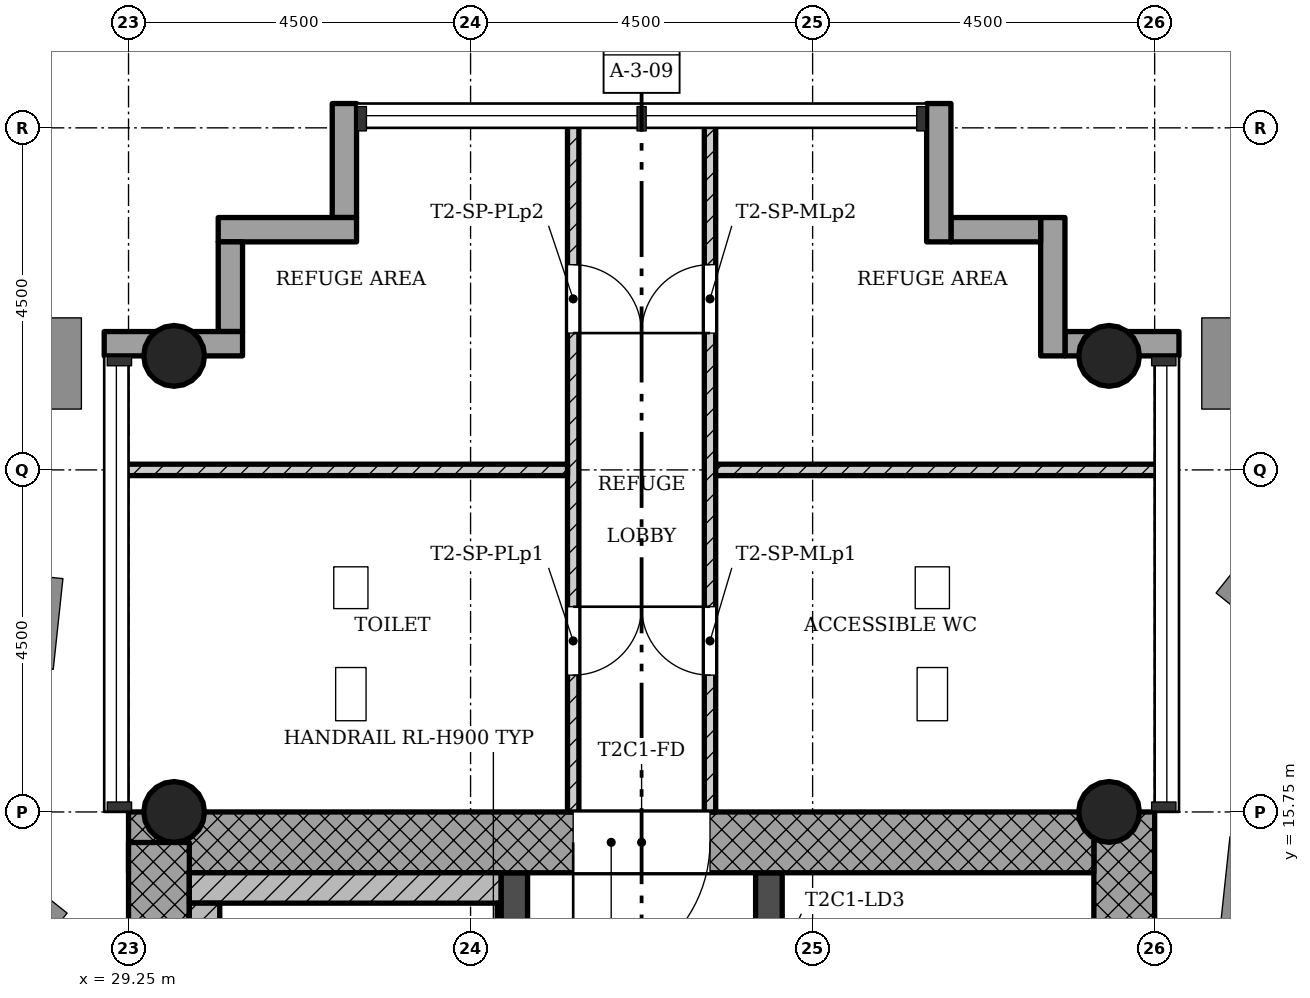
"""IFC4 building model, lengths in metres.
Left out: names, types, materials, properties, quantities, classifications, styles, units other than length and angle.
Written with IfcOpenShell. Run it as: python <this file> out.ifc"""

import sys

from ifc_helpers import new_model, si_unit, direction, frame, frame_2d, origin, origin_2d, place, context, subcontext, project, spatial, rectangle, hollow_circle, extrude, element, fill, save


model = new_model("IFC4")
c1 = context("Model", 3, precision=1e-05, world=origin(), true_north=direction((0.0, 1.0)))
c2 = subcontext(c1, "Body", "Model", "MODEL_VIEW")
j1 = project(units=[si_unit("LENGTHUNIT", "METRE"), si_unit("PLANEANGLEUNIT", "RADIAN")], contexts=[c1])
p1 = place(None, origin())
s1 = spatial("IfcSite", under=j1, at=p1, CompositionType="ELEMENT")
p2 = place(p1, origin())
s2 = spatial("IfcBuilding", under=s1, at=p2, CompositionType="ELEMENT")
p3 = place(p2, frame((0.0, 0.0, 181.3)))
s3 = spatial("IfcBuildingStorey", under=s2, at=p3, CompositionType="ELEMENT", Elevation=181.3)
p4 = place(p3, frame((42.35, 7.55, 0.0), z_axis=(0.0, 0.0, 1.0), x_axis=(0.0, 1.0, 0.0)))
e1 = element("IfcWall", 1, at=p4, inside=s3, PredefinedType="SHEAR", context=c2, shape_type="SweptSolid", body=[
    extrude(rectangle(XDim=8.2, YDim=0.8, at=frame_2d((4.1, 0.0))), origin(), (0.0, 0.0, 1.0), 4.5),
])
p5 = place(p3, frame((41.95, 15.35, 0.0), z_axis=(0.0, 0.0, 1.0), x_axis=(-1.0, 0.0, 0.0)))
e2 = element("IfcWall", 2, at=p5, inside=s3, PredefinedType="SHEAR", context=c2, shape_type="SweptSolid", body=[
    extrude(rectangle(XDim=12.7, YDim=0.8, at=frame_2d((6.35, 0.0))), origin(), (0.0, 0.0, 1.0), 4.5),
])
p6 = place(p5, frame((5.05, 0.0, 0.0)))
e3 = element("IfcOpeningElement", 3, at=p6, cuts=e2, PredefinedType="OPENING", context=c2, shape_type="SweptSolid", body=[
    extrude(rectangle(XDim=1.8, YDim=2.1, at=frame_2d((0.9, 1.05))), frame((0.0, 0.41, 0.0), z_axis=(0.0, -1.0, 0.0), x_axis=(1.0, 0.0, 0.0)), (0.0, 0.0, 1.0), 0.82),
])
p7 = place(p3, frame((29.65, 15.348, 0.0), z_axis=(0.0, 0.0, 1.0), x_axis=(0.0, -1.0, 0.0)))
e4 = element("IfcWall", 4, at=p7, inside=s3, PredefinedType="SHEAR", context=c2, shape_type="SweptSolid", body=[
    extrude(rectangle(XDim=8.796, YDim=0.8, at=frame_2d((4.398, 0.0))), origin(), (0.0, 0.0, 1.0), 4.5),
])
p8 = place(p3, frame((34.325, 7.55, 0.0), z_axis=(0.0, 0.0, 1.0), x_axis=(0.0, 1.0, 0.0)))
e5 = element("IfcWall", 5, at=p8, inside=s3, PredefinedType="SHEAR", context=c2, shape_type="SweptSolid", body=[
    extrude(rectangle(XDim=7.4, YDim=0.35, at=frame_2d((3.7, 0.0))), origin(), (0.0, 0.0, 1.0), 4.5),
])
p9 = place(p8, frame((0.85, 0.0, 0.0)))
e6 = element("IfcOpeningElement", 6, at=p9, cuts=e5, PredefinedType="OPENING", context=c2, shape_type="SweptSolid", body=[
    extrude(rectangle(XDim=0.9, YDim=2.1, at=frame_2d((0.45, 1.05))), frame((0.0, 0.185, 0.0), z_axis=(0.0, -1.0, 0.0), x_axis=(1.0, 0.0, 0.0)), (0.0, 0.0, 1.0), 0.37),
])
p10 = place(p3, frame((37.675, 7.55, 0.0), z_axis=(0.0, 0.0, 1.0), x_axis=(0.0, 1.0, 0.0)))
e7 = element("IfcWall", 7, at=p10, inside=s3, PredefinedType="SHEAR", context=c2, shape_type="SweptSolid", body=[
    extrude(rectangle(XDim=7.4, YDim=0.35, at=frame_2d((3.7, 0.0))), origin(), (0.0, 0.0, 1.0), 4.5),
])
p11 = place(p10, frame((0.95, 0.0, 0.0)))
e8 = element("IfcOpeningElement", 8, at=p11, cuts=e7, PredefinedType="OPENING", context=c2, shape_type="SweptSolid", body=[
    extrude(rectangle(XDim=1.1, YDim=2.1, at=frame_2d((0.55, 1.05))), frame((0.0, 0.185, 0.0), z_axis=(0.0, -1.0, 0.0), x_axis=(1.0, 0.0, 0.0)), (0.0, 0.0, 1.0), 0.37),
])
p12 = place(p10, frame((3.15, 0.0, 0.0)))
e9 = element("IfcOpeningElement", 9, at=p12, cuts=e7, PredefinedType="OPENING", context=c2, shape_type="SweptSolid", body=[
    extrude(rectangle(XDim=1.1, YDim=2.1, at=frame_2d((0.55, 1.05))), frame((0.0, 0.185, 0.0), z_axis=(0.0, -1.0, 0.0), x_axis=(1.0, 0.0, 0.0)), (0.0, 0.0, 1.0), 0.37),
])
p13 = place(p10, frame((5.35, 0.0, 0.0)))
e10 = element("IfcOpeningElement", 10, at=p13, cuts=e7, PredefinedType="OPENING", context=c2, shape_type="SweptSolid", body=[
    extrude(rectangle(XDim=1.1, YDim=2.1, at=frame_2d((0.55, 1.05))), frame((0.0, 0.185, 0.0), z_axis=(0.0, -1.0, 0.0), x_axis=(1.0, 0.0, 0.0)), (0.0, 0.0, 1.0), 0.37),
])
for number, where, z_axis, x_axis in (
    (11, (42.15, 15.75, 0.0), (0.0, 0.0, 1.0), (1.0, 0.0, 0.0)),
    (12, (29.85, 15.75, 0.0), (0.0, 0.0, 1.0), (1.0, 0.0, 0.0)),
    (13, (42.15, 21.75, 0.0), (0.0, 0.0, 1.0), (1.0, 0.0, 0.0)),
    (14, (29.85, 21.75, 0.0), (0.0, 0.0, 1.0), (1.0, 0.0, 0.0)),
):
    element("IfcColumn", number, at=place(p3, frame(where, z_axis=z_axis, x_axis=x_axis)), inside=s3, PredefinedType="COLUMN", context=c2, shape_type="SweptSolid", body=[
        extrude(hollow_circle(Radius=0.4, WallThickness=0.028, at=origin_2d()), origin(), (0.0, 0.0, 1.0), 4.5),
    ])
p14 = place(p3, frame((43.07, 21.91, -0.3), z_axis=(0.0, 0.0, 1.0), x_axis=(-1.0, 0.0, 0.0)))
e15 = element("IfcWall", 15, at=p14, inside=s3, PredefinedType="STANDARD", context=c2, shape_type="SweptSolid", body=[
    extrude(rectangle(XDim=1.5, YDim=0.32, at=frame_2d((0.75, 0.0))), origin(), (0.0, 0.0, 1.0), 4.5),
])
p15 = place(p3, frame((41.41, 21.75, -0.3), z_axis=(0.0, 0.0, 1.0), x_axis=(0.0, 1.0, 0.0)))
e16 = element("IfcWall", 16, at=p15, inside=s3, PredefinedType="STANDARD", context=c2, shape_type="SweptSolid", body=[
    extrude(rectangle(XDim=1.82, YDim=0.32, at=frame_2d((0.91, 0.0))), origin(), (0.0, 0.0, 1.0), 4.5),
])
p16 = place(p3, frame((41.25, 23.41, -0.3), z_axis=(0.0, 0.0, 1.0), x_axis=(-1.0, 0.0, 0.0)))
e17 = element("IfcWall", 17, at=p16, inside=s3, PredefinedType="STANDARD", context=c2, shape_type="SweptSolid", body=[
    extrude(rectangle(XDim=1.18, YDim=0.32, at=frame_2d((0.59, 0.0))), origin(), (0.0, 0.0, 1.0), 4.5),
])
p17 = place(p3, frame((39.91, 23.25, -0.3), z_axis=(0.0, 0.0, 1.0), x_axis=(0.0, 1.0, 0.0)))
e18 = element("IfcWall", 18, at=p17, inside=s3, PredefinedType="STANDARD", context=c2, shape_type="SweptSolid", body=[
    extrude(rectangle(XDim=1.82, YDim=0.32, at=frame_2d((0.91, 0.0))), origin(), (0.0, 0.0, 1.0), 4.5),
])
p18 = place(p3, frame((32.09, 25.07, -0.3), z_axis=(0.0, 0.0, 1.0), x_axis=(0.0, -1.0, 0.0)))
e19 = element("IfcWall", 19, at=p18, inside=s3, PredefinedType="STANDARD", context=c2, shape_type="SweptSolid", body=[
    extrude(rectangle(XDim=1.5, YDim=0.32, at=frame_2d((0.75, 0.0))), origin(), (0.0, 0.0, 1.0), 4.5),
])
p19 = place(p3, frame((32.25, 23.41, -0.3), z_axis=(0.0, 0.0, 1.0), x_axis=(-1.0, 0.0, 0.0)))
e20 = element("IfcWall", 20, at=p19, inside=s3, PredefinedType="STANDARD", context=c2, shape_type="SweptSolid", body=[
    extrude(rectangle(XDim=1.82, YDim=0.32, at=frame_2d((0.91, 0.0))), origin(), (0.0, 0.0, 1.0), 4.5),
])
p20 = place(p3, frame((30.59, 23.25, -0.3), z_axis=(0.0, 0.0, 1.0), x_axis=(0.0, -1.0, 0.0)))
e21 = element("IfcWall", 21, at=p20, inside=s3, PredefinedType="STANDARD", context=c2, shape_type="SweptSolid", body=[
    extrude(rectangle(XDim=1.18, YDim=0.32, at=frame_2d((0.59, 0.0))), origin(), (0.0, 0.0, 1.0), 4.5),
])
p21 = place(p3, frame((30.75, 21.91, -0.3), z_axis=(0.0, 0.0, 1.0), x_axis=(-1.0, 0.0, 0.0)))
e22 = element("IfcWall", 22, at=p21, inside=s3, PredefinedType="STANDARD", context=c2, shape_type="SweptSolid", body=[
    extrude(rectangle(XDim=1.82, YDim=0.32, at=frame_2d((0.91, 0.0))), origin(), (0.0, 0.0, 1.0), 4.5),
])
p22 = place(p3, frame((35.1, 15.75, 0.0), z_axis=(0.0, 0.0, 1.0), x_axis=(0.0, 1.0, 0.0)))
e23 = element("IfcWall", 23, at=p22, inside=s3, PredefinedType="PARTITIONING", context=c2, shape_type="SweptSolid", body=[
    extrude(rectangle(XDim=9.1, YDim=0.15, at=frame_2d((4.55, 0.0))), origin(), (0.0, 0.0, 1.0), 4.08),
])
p23 = place(p22, frame((1.8, 0.0, 0.0)))
e24 = element("IfcOpeningElement", 24, at=p23, cuts=e23, PredefinedType="OPENING", context=c2, shape_type="SweptSolid", body=[
    extrude(rectangle(XDim=0.9, YDim=2.1, at=frame_2d((0.45, 1.05))), frame((0.0, 0.085, 0.0), z_axis=(0.0, -1.0, 0.0), x_axis=(1.0, 0.0, 0.0)), (0.0, 0.0, 1.0), 0.17),
])
p24 = place(p22, frame((6.3, 0.0, 0.0)))
e25 = element("IfcOpeningElement", 25, at=p24, cuts=e23, PredefinedType="OPENING", context=c2, shape_type="SweptSolid", body=[
    extrude(rectangle(XDim=0.9, YDim=2.1, at=frame_2d((0.45, 1.05))), frame((0.0, 0.085, 0.0), z_axis=(0.0, -1.0, 0.0), x_axis=(1.0, 0.0, 0.0)), (0.0, 0.0, 1.0), 0.17),
])
p25 = place(p3, frame((35.025, 20.25, 0.0), z_axis=(0.0, 0.0, 1.0), x_axis=(-1.0, 0.0, 0.0)))
e26 = element("IfcWall", 26, at=p25, inside=s3, PredefinedType="PARTITIONING", context=c2, shape_type="SweptSolid", body=[
    extrude(rectangle(XDim=5.875, YDim=0.15, at=frame_2d((2.938, 0.0))), origin(), (0.0, 0.0, 1.0), 4.08),
])
p26 = place(p3, frame((36.9, 15.75, 0.0), z_axis=(0.0, 0.0, 1.0), x_axis=(0.0, 1.0, 0.0)))
e27 = element("IfcWall", 27, at=p26, inside=s3, PredefinedType="PARTITIONING", context=c2, shape_type="SweptSolid", body=[
    extrude(rectangle(XDim=9.1, YDim=0.15, at=frame_2d((4.55, 0.0))), origin(), (0.0, 0.0, 1.0), 4.08),
])
p27 = place(p26, frame((1.8, 0.0, 0.0)))
e28 = element("IfcOpeningElement", 28, at=p27, cuts=e27, PredefinedType="OPENING", context=c2, shape_type="SweptSolid", body=[
    extrude(rectangle(XDim=0.9, YDim=2.1, at=frame_2d((0.45, 1.05))), frame((0.0, 0.085, 0.0), z_axis=(0.0, -1.0, 0.0), x_axis=(1.0, 0.0, 0.0)), (0.0, 0.0, 1.0), 0.17),
])
p28 = place(p26, frame((6.3, 0.0, 0.0)))
e29 = element("IfcOpeningElement", 29, at=p28, cuts=e27, PredefinedType="OPENING", context=c2, shape_type="SweptSolid", body=[
    extrude(rectangle(XDim=0.9, YDim=2.1, at=frame_2d((0.45, 1.05))), frame((0.0, 0.085, 0.0), z_axis=(0.0, -1.0, 0.0), x_axis=(1.0, 0.0, 0.0)), (0.0, 0.0, 1.0), 0.17),
])
p29 = place(p3, frame((36.975, 20.25, 0.0), z_axis=(0.0, 0.0, 1.0), x_axis=(1.0, 0.0, 0.0)))
e30 = element("IfcWall", 30, at=p29, inside=s3, PredefinedType="PARTITIONING", context=c2, shape_type="SweptSolid", body=[
    extrude(rectangle(XDim=5.875, YDim=0.15, at=frame_2d((2.938, 0.0))), origin(), (0.0, 0.0, 1.0), 4.08),
])
p30 = place(p3, frame((34.15, 14.75, 0.0), z_axis=(0.0, 0.0, 1.0), x_axis=(-1.0, 0.0, 0.0)))
e31 = element("IfcWall", 31, at=p30, inside=s3, PredefinedType="SHEAR", context=c2, shape_type="SweptSolid", body=[
    extrude(rectangle(XDim=4.1, YDim=0.4, at=frame_2d((2.05, 0.0))), origin(), (0.0, 0.0, 1.0), 4.5),
])
p31 = place(p3, frame((30.25, 7.95, 0.0), z_axis=(0.0, 0.0, 1.0), x_axis=(0.0, 1.0, 0.0)))
e32 = element("IfcWall", 32, at=p31, inside=s3, PredefinedType="SHEAR", context=c2, shape_type="SweptSolid", body=[
    extrude(rectangle(XDim=6.6, YDim=0.4, at=frame_2d((3.3, 0.0))), origin(), (0.0, 0.0, 1.0), 4.5),
])
p32 = place(p3, frame((34.125, 9.35, 0.0), z_axis=(0.0, 0.0, 1.0), x_axis=(0.0, 1.0, 0.0)))
e33 = element("IfcWall", 33, at=p32, inside=s3, PredefinedType="SHEAR", context=c2, shape_type="SweptSolid", body=[
    extrude(rectangle(XDim=5.2, YDim=0.05, at=frame_2d((2.6, 0.0))), origin(), (0.0, 0.0, 1.0), 4.5),
])
p33 = place(p23, origin())
e34 = element("IfcDoor", 34, at=p33, inside=s3, OperationType="SINGLE_SWING_RIGHT", PredefinedType="DOOR", context=c2, shape_type="SweptSolid", body=[
    extrude(rectangle(XDim=0.9, YDim=2.1, at=frame_2d((0.45, 1.05))), frame((0.0, 0.025, 0.0), z_axis=(0.0, -1.0, 0.0), x_axis=(1.0, 0.0, 0.0)), (0.0, 0.0, 1.0), 0.05),
])
fill(e24, e34)
p34 = place(p24, origin())
e35 = element("IfcDoor", 35, at=p34, inside=s3, OperationType="SINGLE_SWING_LEFT", PredefinedType="DOOR", context=c2, shape_type="SweptSolid", body=[
    extrude(rectangle(XDim=0.9, YDim=2.1, at=frame_2d((0.45, 1.05))), frame((0.0, 0.025, 0.0), z_axis=(0.0, -1.0, 0.0), x_axis=(1.0, 0.0, 0.0)), (0.0, 0.0, 1.0), 0.05),
])
fill(e25, e35)
p35 = place(p27, origin())
e36 = element("IfcDoor", 36, at=p35, inside=s3, OperationType="SINGLE_SWING_LEFT", PredefinedType="DOOR", context=c2, shape_type="SweptSolid", body=[
    extrude(rectangle(XDim=0.9, YDim=2.1, at=frame_2d((0.45, 1.05))), frame((0.0, 0.025, 0.0), z_axis=(0.0, -1.0, 0.0), x_axis=(1.0, 0.0, 0.0)), (0.0, 0.0, 1.0), 0.05),
])
fill(e28, e36)
p36 = place(p28, origin())
e37 = element("IfcDoor", 37, at=p36, inside=s3, OperationType="SINGLE_SWING_RIGHT", PredefinedType="DOOR", context=c2, shape_type="SweptSolid", body=[
    extrude(rectangle(XDim=0.9, YDim=2.1, at=frame_2d((0.45, 1.05))), frame((0.0, 0.025, 0.0), z_axis=(0.0, -1.0, 0.0), x_axis=(1.0, 0.0, 0.0)), (0.0, 0.0, 1.0), 0.05),
])
fill(e29, e37)
p37 = place(p6, origin())
e38 = element("IfcDoor", 38, at=p37, inside=s3, OperationType="SINGLE_SWING_LEFT", PredefinedType="DOOR", context=c2, shape_type="SweptSolid", body=[
    extrude(rectangle(XDim=1.8, YDim=2.1, at=frame_2d((0.9, 1.05))), frame((0.0, 0.025, 0.0), z_axis=(0.0, -1.0, 0.0), x_axis=(1.0, 0.0, 0.0)), (0.0, 0.0, 1.0), 0.05),
])
fill(e3, e38)
save(model, sys.argv[1])
